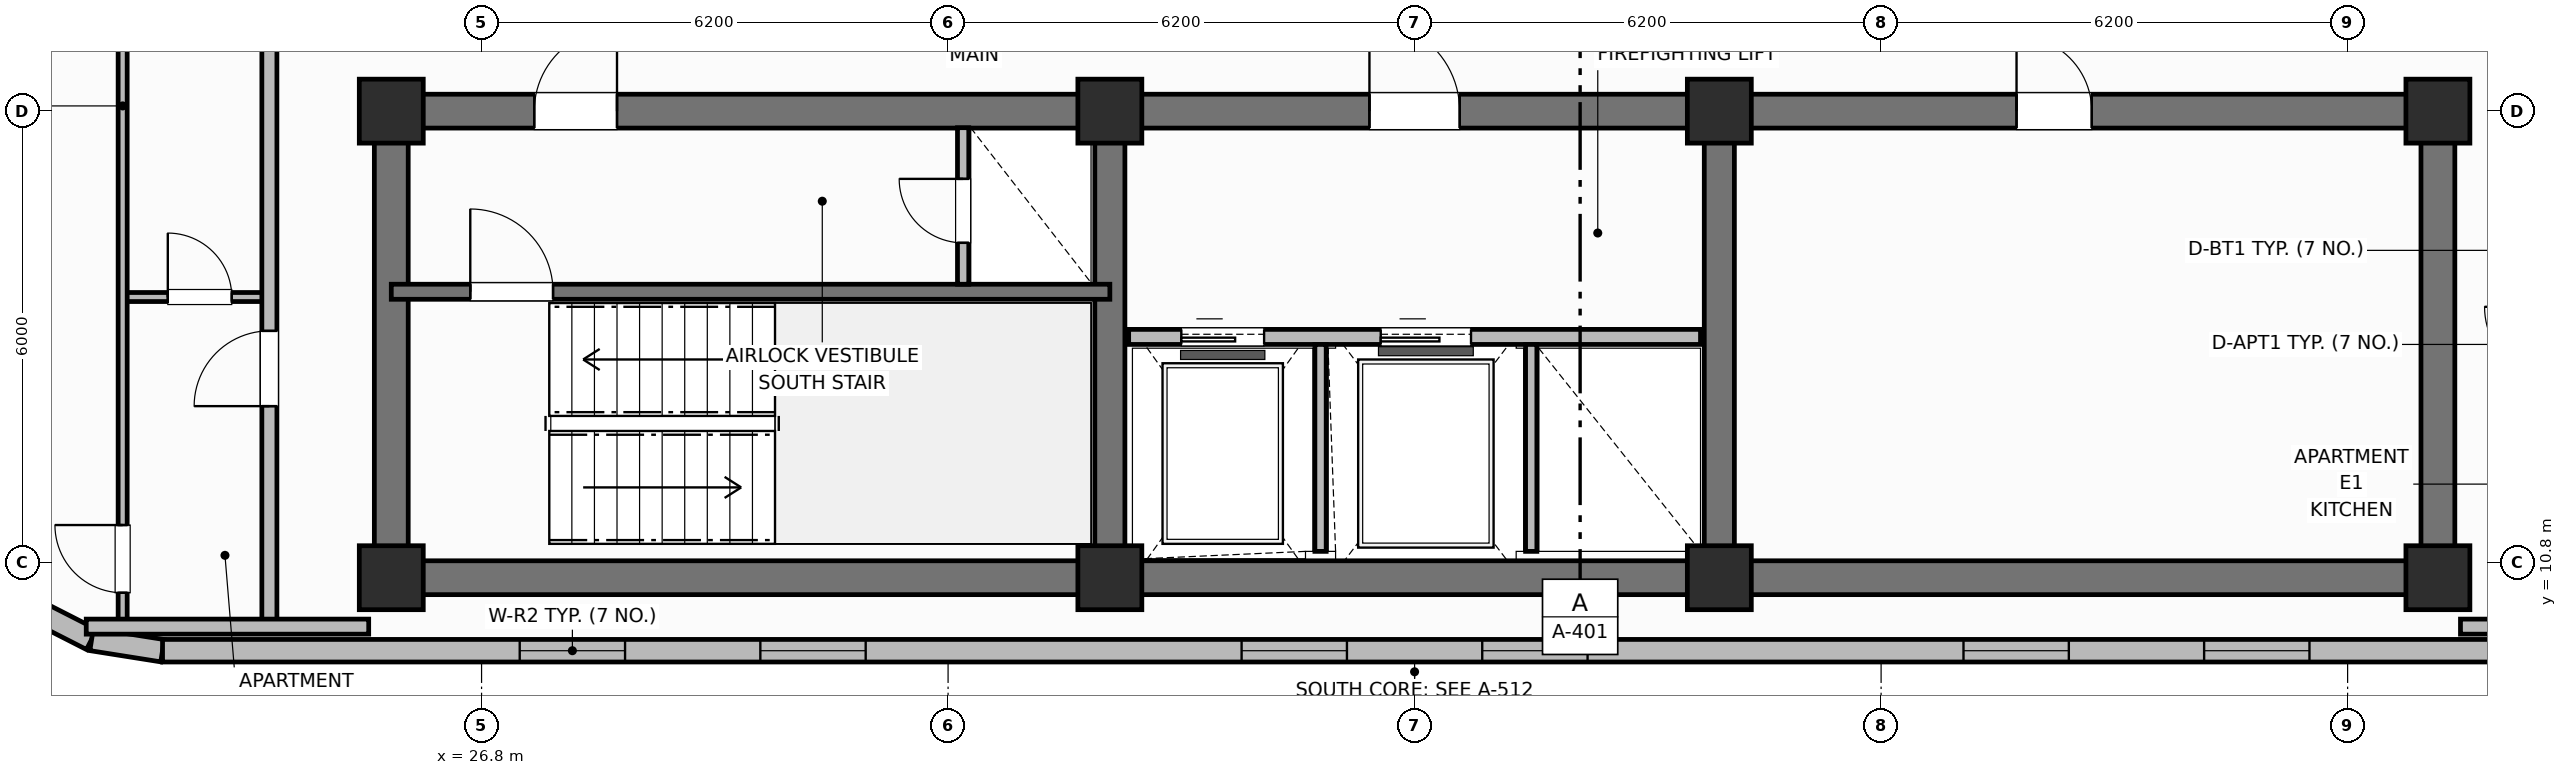
"""IFC4 building model, lengths in metres.
Left out: names, types, materials, properties, quantities, classifications, styles, units other than length and angle.
Written with IfcOpenShell. Run it as: python <this file> out.ifc"""

import sys

from ifc_helpers import new_model, si_unit, direction, frame, frame_2d, origin, origin_2d, place, context, subcontext, project, spatial, rectangle, extrude, element, fill, save


model = new_model("IFC4")
c1 = context("Model", 3, precision=1e-05, world=origin(), true_north=direction((0.0, 1.0)))
c2 = subcontext(c1, "Body", "Model", "MODEL_VIEW")
j1 = project(units=[si_unit("LENGTHUNIT", "METRE"), si_unit("PLANEANGLEUNIT", "RADIAN")], contexts=[c1])
p1 = place(None, origin())
s1 = spatial("IfcSite", under=j1, at=p1, CompositionType="ELEMENT")
p2 = place(p1, origin())
s2 = spatial("IfcBuilding", under=s1, at=p2, CompositionType="ELEMENT")
p3 = place(p2, frame((0.0, 0.0, 229.5)))
s3 = spatial("IfcBuildingStorey", under=s2, at=p3, CompositionType="ELEMENT", Elevation=229.5)
p4 = place(p3, frame((52.8, 10.6, 0.0), z_axis=(0.0, 0.0, 1.0), x_axis=(-1.0, 0.0, 0.0)))
e1 = element("IfcWall", 1, at=p4, inside=s3, PredefinedType="SHEAR", context=c2, shape_type="SweptSolid", body=[
    extrude(rectangle(XDim=27.2, YDim=0.45, at=frame_2d((13.6, 0.0))), origin(), (0.0, 0.0, 1.0), 3.7),
])
for number, where, z_axis, x_axis in (
    (2, (25.6, 10.825, 0.0), (0.0, 0.0, 1.0), (0.0, 1.0, 0.0)),
    (3, (52.8, 10.825, 0.0), (0.0, 0.0, 1.0), (0.0, 1.0, 0.0)),
):
    element("IfcWall", number, at=place(p3, frame(where, z_axis=z_axis, x_axis=x_axis)), inside=s3, PredefinedType="SHEAR", context=c2, shape_type="SweptSolid", body=[
        extrude(rectangle(XDim=5.75, YDim=0.45, at=frame_2d((2.875, 0.0))), origin(), (0.0, 0.0, 1.0), 3.7),
    ])
p5 = place(p3, frame((25.6, 16.8, 0.0), z_axis=(0.0, 0.0, 1.0), x_axis=(1.0, 0.0, 0.0)))
e4 = element("IfcWall", 4, at=p5, inside=s3, PredefinedType="SHEAR", context=c2, shape_type="SweptSolid", body=[
    extrude(rectangle(XDim=27.2, YDim=0.45, at=frame_2d((13.6, 0.0))), origin(), (0.0, 0.0, 1.0), 3.7),
])
p6 = place(p5, frame((1.9, 0.0, 0.0)))
e5 = element("IfcOpeningElement", 5, at=p6, cuts=e4, PredefinedType="OPENING", context=c2, shape_type="SweptSolid", body=[
    extrude(rectangle(XDim=1.1, YDim=2.15, at=frame_2d((0.55, 1.075))), frame((0.0, 0.235, 0.0), z_axis=(0.0, -1.0, 0.0), x_axis=(1.0, 0.0, 0.0)), (0.0, 0.0, 1.0), 0.47),
])
p7 = place(p5, frame((13.0, 0.0, 0.0)))
e6 = element("IfcOpeningElement", 6, at=p7, cuts=e4, PredefinedType="OPENING", context=c2, shape_type="SweptSolid", body=[
    extrude(rectangle(XDim=1.2, YDim=2.15, at=frame_2d((0.6, 1.075))), frame((0.0, 0.235, 0.0), z_axis=(0.0, -1.0, 0.0), x_axis=(1.0, 0.0, 0.0)), (0.0, 0.0, 1.0), 0.47),
])
p8 = place(p5, frame((21.6, 0.0, 0.0)))
e7 = element("IfcOpeningElement", 7, at=p8, cuts=e4, PredefinedType="OPENING", context=c2, shape_type="SweptSolid", body=[
    extrude(rectangle(XDim=1.0, YDim=2.15, at=frame_2d((0.5, 1.075))), frame((0.0, 0.235, 0.0), z_axis=(0.0, -1.0, 0.0), x_axis=(1.0, 0.0, 0.0)), (0.0, 0.0, 1.0), 0.47),
])
for number, where, z_axis, x_axis in (
    (8, (35.15, 10.825, 0.0), (0.0, 0.0, 1.0), (0.0, 1.0, 0.0)),
    (9, (43.25, 10.825, 0.0), (0.0, 0.0, 1.0), (0.0, 1.0, 0.0)),
):
    element("IfcWall", number, at=place(p3, frame(where, z_axis=z_axis, x_axis=x_axis)), inside=s3, PredefinedType="SHEAR", context=c2, shape_type="SweptSolid", body=[
        extrude(rectangle(XDim=5.75, YDim=0.4, at=frame_2d((2.875, 0.0))), origin(), (0.0, 0.0, 1.0), 3.7),
    ])
for number, where, z_axis, x_axis in (
    (10, (25.6, 10.6, 0.0), (0.0, 0.0, 1.0), (1.0, 0.0, 0.0)),
    (11, (25.6, 16.8, 0.0), (0.0, 0.0, 1.0), (1.0, 0.0, 0.0)),
    (12, (35.15, 10.6, 0.0), (0.0, 0.0, 1.0), (1.0, 0.0, 0.0)),
    (13, (35.15, 16.8, 0.0), (0.0, 0.0, 1.0), (1.0, 0.0, 0.0)),
    (14, (43.25, 10.6, 0.0), (0.0, 0.0, 1.0), (1.0, 0.0, 0.0)),
    (15, (43.25, 16.8, 0.0), (0.0, 0.0, 1.0), (1.0, 0.0, 0.0)),
    (16, (52.8, 10.6, 0.0), (0.0, 0.0, 1.0), (1.0, 0.0, 0.0)),
    (17, (52.8, 16.8, 0.0), (0.0, 0.0, 1.0), (1.0, 0.0, 0.0)),
):
    element("IfcColumn", number, at=place(p3, frame(where, z_axis=z_axis, x_axis=x_axis)), inside=s3, PredefinedType="COLUMN", context=c2, shape_type="SweptSolid", body=[
        extrude(rectangle(XDim=0.85, YDim=0.85, at=origin_2d()), origin(), (0.0, 0.0, 1.0), 3.7),
    ])
p9 = place(p3, frame((20.767, 10.212, 0.0), z_axis=(0.0, 0.0, 1.0), x_axis=(0.891023873617, -0.45395644796, 0.0)))
e18 = element("IfcWall", 18, at=p9, inside=s3, PredefinedType="SOLIDWALL", context=c2, shape_type="SweptSolid", body=[
    extrude(rectangle(XDim=0.954, YDim=0.3, at=frame_2d((0.477, 0.0))), origin(), (0.0, 0.0, 1.0), 2.73),
])
p10 = place(p3, frame((21.617, 9.779, 0.0), z_axis=(0.0, 0.0, 1.0), x_axis=(0.987669453596, -0.156553666304, 0.0)))
e19 = element("IfcWall", 19, at=p10, inside=s3, PredefinedType="SOLIDWALL", context=c2, shape_type="SweptSolid", body=[
    extrude(rectangle(XDim=0.954, YDim=0.3, at=frame_2d((0.477, 0.0))), origin(), (0.0, 0.0, 1.0), 2.73),
])
p11 = place(p3, frame((22.56, 9.63, 0.0), z_axis=(0.0, 0.0, 1.0), x_axis=(1.0, 0.0, 0.0)))
e20 = element("IfcWall", 20, at=p11, inside=s3, PredefinedType="SOLIDWALL", context=c2, shape_type="SweptSolid", body=[
    extrude(rectangle(XDim=33.28, YDim=0.3, at=frame_2d((16.64, 0.0))), origin(), (0.0, 0.0, 1.0), 2.73),
])
p12 = place(p11, frame((4.747, 0.0, 0.76)))
e21 = element("IfcOpeningElement", 21, at=p12, cuts=e20, PredefinedType="OPENING", context=c2, shape_type="SweptSolid", body=[
    extrude(rectangle(XDim=1.4, YDim=1.85, at=frame_2d((0.7, 0.925))), frame((0.0, 0.16, 0.0), z_axis=(0.0, -1.0, 0.0), x_axis=(1.0, 0.0, 0.0)), (0.0, 0.0, 1.0), 0.32),
])
p13 = place(p11, frame((7.945, 0.0, 0.76)))
e22 = element("IfcOpeningElement", 22, at=p13, cuts=e20, PredefinedType="OPENING", context=c2, shape_type="SweptSolid", body=[
    extrude(rectangle(XDim=1.4, YDim=1.85, at=frame_2d((0.7, 0.925))), frame((0.0, 0.16, 0.0), z_axis=(0.0, -1.0, 0.0), x_axis=(1.0, 0.0, 0.0)), (0.0, 0.0, 1.0), 0.32),
])
p14 = place(p11, frame((14.341, 0.0, 0.76)))
e23 = element("IfcOpeningElement", 23, at=p14, cuts=e20, PredefinedType="OPENING", context=c2, shape_type="SweptSolid", body=[
    extrude(rectangle(XDim=1.4, YDim=1.85, at=frame_2d((0.7, 0.925))), frame((0.0, 0.16, 0.0), z_axis=(0.0, -1.0, 0.0), x_axis=(1.0, 0.0, 0.0)), (0.0, 0.0, 1.0), 0.32),
])
p15 = place(p11, frame((17.539, 0.0, 0.76)))
e24 = element("IfcOpeningElement", 24, at=p15, cuts=e20, PredefinedType="OPENING", context=c2, shape_type="SweptSolid", body=[
    extrude(rectangle(XDim=1.4, YDim=1.85, at=frame_2d((0.7, 0.925))), frame((0.0, 0.16, 0.0), z_axis=(0.0, -1.0, 0.0), x_axis=(1.0, 0.0, 0.0)), (0.0, 0.0, 1.0), 0.32),
])
p16 = place(p11, frame((23.935, 0.0, 0.76)))
e25 = element("IfcOpeningElement", 25, at=p16, cuts=e20, PredefinedType="OPENING", context=c2, shape_type="SweptSolid", body=[
    extrude(rectangle(XDim=1.4, YDim=1.85, at=frame_2d((0.7, 0.925))), frame((0.0, 0.16, 0.0), z_axis=(0.0, -1.0, 0.0), x_axis=(1.0, 0.0, 0.0)), (0.0, 0.0, 1.0), 0.32),
])
p17 = place(p11, frame((27.133, 0.0, 0.76)))
e26 = element("IfcOpeningElement", 26, at=p17, cuts=e20, PredefinedType="OPENING", context=c2, shape_type="SweptSolid", body=[
    extrude(rectangle(XDim=1.4, YDim=1.85, at=frame_2d((0.7, 0.925))), frame((0.0, 0.16, 0.0), z_axis=(0.0, -1.0, 0.0), x_axis=(1.0, 0.0, 0.0)), (0.0, 0.0, 1.0), 0.32),
])
p18 = place(p3, frame((25.6, 14.4, 0.0), z_axis=(0.0, 0.0, 1.0), x_axis=(1.0, 0.0, 0.0)))
e27 = element("IfcWall", 27, at=p18, inside=s3, PredefinedType="SHEAR", context=c2, shape_type="SweptSolid", body=[
    extrude(rectangle(XDim=9.55, YDim=0.2, at=frame_2d((4.775, 0.0))), origin(), (0.0, 0.0, 1.0), 3.7),
])
p19 = place(p18, frame((1.05, 0.0, 0.0)))
e28 = element("IfcOpeningElement", 28, at=p19, cuts=e27, PredefinedType="OPENING", context=c2, shape_type="SweptSolid", body=[
    extrude(rectangle(XDim=1.1, YDim=2.15, at=frame_2d((0.55, 1.075))), frame((0.0, 0.11, 0.0), z_axis=(0.0, -1.0, 0.0), x_axis=(1.0, 0.0, 0.0)), (0.0, 0.0, 1.0), 0.22),
])
p20 = place(p3, frame((33.2, 14.5, 0.0), z_axis=(0.0, 0.0, 1.0), x_axis=(0.0, 1.0, 0.0)))
e29 = element("IfcWall", 29, at=p20, inside=s3, PredefinedType="PARTITIONING", context=c2, shape_type="SweptSolid", body=[
    extrude(rectangle(XDim=2.08, YDim=0.15, at=frame_2d((1.04, 0.0))), origin(), (0.0, 0.0, 1.0), 2.56),
])
p21 = place(p20, frame((0.55, 0.0, 0.0)))
e30 = element("IfcOpeningElement", 30, at=p21, cuts=e29, PredefinedType="OPENING", context=c2, shape_type="SweptSolid", body=[
    extrude(rectangle(XDim=0.85, YDim=2.05, at=frame_2d((0.425, 1.025))), frame((0.0, 0.085, 0.0), z_axis=(0.0, -1.0, 0.0), x_axis=(1.0, 0.0, 0.0)), (0.0, 0.0, 1.0), 0.17),
])
p22 = place(p3, frame((35.4, 13.8, 0.0), z_axis=(0.0, 0.0, 1.0), x_axis=(1.0, 0.0, 0.0)))
e31 = element("IfcWall", 31, at=p22, inside=s3, PredefinedType="PARTITIONING", context=c2, shape_type="SweptSolid", body=[
    extrude(rectangle(XDim=7.6, YDim=0.2, at=frame_2d((3.8, 0.0))), origin(), (0.0, 0.0, 1.0), 2.33),
])
p23 = place(p22, frame((0.7, 0.0, 0.0)))
e32 = element("IfcOpeningElement", 32, at=p23, cuts=e31, PredefinedType="OPENING", context=c2, shape_type="SweptSolid", body=[
    extrude(rectangle(XDim=1.1, YDim=2.15, at=frame_2d((0.55, 1.075))), frame((0.0, 0.11, 0.0), z_axis=(0.0, -1.0, 0.0), x_axis=(1.0, 0.0, 0.0)), (0.0, 0.0, 1.0), 0.22),
])
p24 = place(p22, frame((3.35, 0.0, 0.0)))
e33 = element("IfcOpeningElement", 33, at=p24, cuts=e31, PredefinedType="OPENING", context=c2, shape_type="SweptSolid", body=[
    extrude(rectangle(XDim=1.2, YDim=2.15, at=frame_2d((0.6, 1.075))), frame((0.0, 0.11, 0.0), z_axis=(0.0, -1.0, 0.0), x_axis=(1.0, 0.0, 0.0)), (0.0, 0.0, 1.0), 0.22),
])
for number, where, z_axis, x_axis in (
    (34, (37.95, 10.95, 0.0), (0.0, 0.0, 1.0), (0.0, 1.0, 0.0)),
    (35, (40.75, 10.95, 0.0), (0.0, 0.0, 1.0), (0.0, 1.0, 0.0)),
):
    element("IfcWall", number, at=place(p3, frame(where, z_axis=z_axis, x_axis=x_axis)), inside=s3, PredefinedType="PARTITIONING", context=c2, shape_type="SweptSolid", body=[
        extrude(rectangle(XDim=2.75, YDim=0.15, at=frame_2d((1.375, 0.0))), origin(), (0.0, 0.0, 1.0), 2.56),
    ])
p25 = place(p3, frame((22.03, 14.33, 0.0), z_axis=(0.0, 0.0, 1.0), x_axis=(1.0, 0.0, 0.0)))
e36 = element("IfcWall", 36, at=p25, inside=s3, PredefinedType="PARTITIONING", context=c2, shape_type="SweptSolid", body=[
    extrude(rectangle(XDim=1.95, YDim=0.12, at=frame_2d((0.975, 0.0))), origin(), (0.0, 0.0, 1.0), 2.56),
])
p26 = place(p25, frame((0.6, 0.0, 0.0)))
e37 = element("IfcOpeningElement", 37, at=p26, cuts=e36, PredefinedType="OPENING", context=c2, shape_type="SweptSolid", body=[
    extrude(rectangle(XDim=0.85, YDim=2.1, at=frame_2d((0.425, 1.05))), frame((0.0, 0.07, 0.0), z_axis=(0.0, -1.0, 0.0), x_axis=(1.0, 0.0, 0.0)), (0.0, 0.0, 1.0), 0.14),
])
p27 = place(p3, frame((22.03, 9.99, 0.0), z_axis=(0.0, 0.0, 1.0), x_axis=(0.0, 1.0, 0.0)))
e38 = element("IfcWall", 38, at=p27, inside=s3, PredefinedType="PARTITIONING", context=c2, shape_type="SweptSolid", body=[
    extrude(rectangle(XDim=9.045, YDim=0.12, at=frame_2d((4.522, 0.0))), origin(), (0.0, 0.0, 1.0), 2.56),
])
p28 = place(p27, frame((0.41, 0.0, 0.0)))
e39 = element("IfcOpeningElement", 39, at=p28, cuts=e38, PredefinedType="OPENING", context=c2, shape_type="SweptSolid", body=[
    extrude(rectangle(XDim=0.9, YDim=2.1, at=frame_2d((0.45, 1.05))), frame((0.0, 0.07, 0.0), z_axis=(0.0, -1.0, 0.0), x_axis=(1.0, 0.0, 0.0)), (0.0, 0.0, 1.0), 0.14),
])
p29 = place(p3, frame((23.98, 9.95, 0.0), z_axis=(0.0, 0.0, 1.0), x_axis=(0.0, 1.0, 0.0)))
e40 = element("IfcWall", 40, at=p29, inside=s3, PredefinedType="PARTITIONING", context=c2, shape_type="SweptSolid", body=[
    extrude(rectangle(XDim=36.5, YDim=0.2, at=frame_2d((18.25, 0.0))), origin(), (0.0, 0.0, 1.0), 2.56),
])
p30 = place(p29, frame((2.93, 0.0, 0.0)))
e41 = element("IfcOpeningElement", 41, at=p30, cuts=e40, PredefinedType="OPENING", context=c2, shape_type="SweptSolid", body=[
    extrude(rectangle(XDim=1.0, YDim=2.15, at=frame_2d((0.5, 1.075))), frame((0.0, 0.11, 0.0), z_axis=(0.0, -1.0, 0.0), x_axis=(1.0, 0.0, 0.0)), (0.0, 0.0, 1.0), 0.22),
])
p31 = place(p29, frame((10.525, 0.0, 0.0)))
e42 = element("IfcOpeningElement", 42, at=p31, cuts=e40, PredefinedType="OPENING", context=c2, shape_type="SweptSolid", body=[
    extrude(rectangle(XDim=1.0, YDim=2.15, at=frame_2d((0.5, 1.075))), frame((0.0, 0.11, 0.0), z_axis=(0.0, -1.0, 0.0), x_axis=(1.0, 0.0, 0.0)), (0.0, 0.0, 1.0), 0.22),
])
p32 = place(p29, frame((15.175, 0.0, 0.0)))
e43 = element("IfcOpeningElement", 43, at=p32, cuts=e40, PredefinedType="OPENING", context=c2, shape_type="SweptSolid", body=[
    extrude(rectangle(XDim=1.0, YDim=2.15, at=frame_2d((0.5, 1.075))), frame((0.0, 0.11, 0.0), z_axis=(0.0, -1.0, 0.0), x_axis=(1.0, 0.0, 0.0)), (0.0, 0.0, 1.0), 0.22),
])
p33 = place(p29, frame((27.925, 0.0, 0.0)))
e44 = element("IfcOpeningElement", 44, at=p33, cuts=e40, PredefinedType="OPENING", context=c2, shape_type="SweptSolid", body=[
    extrude(rectangle(XDim=1.0, YDim=2.15, at=frame_2d((0.5, 1.075))), frame((0.0, 0.11, 0.0), z_axis=(0.0, -1.0, 0.0), x_axis=(1.0, 0.0, 0.0)), (0.0, 0.0, 1.0), 0.22),
])
p34 = place(p3, frame((21.546, 9.95, 0.0), z_axis=(0.0, 0.0, 1.0), x_axis=(1.0, 0.0, 0.0)))
e45 = element("IfcWall", 45, at=p34, inside=s3, PredefinedType="PARTITIONING", context=c2, shape_type="SweptSolid", body=[
    extrude(rectangle(XDim=3.754, YDim=0.2, at=frame_2d((1.877, 0.0))), origin(), (0.0, 0.0, 1.0), 2.56),
])
p35 = place(p3, frame((53.1, 9.95, 0.0), z_axis=(0.0, 0.0, 1.0), x_axis=(1.0, 0.0, 0.0)))
e46 = element("IfcWall", 46, at=p35, inside=s3, PredefinedType="PARTITIONING", context=c2, shape_type="SweptSolid", body=[
    extrude(rectangle(XDim=3.754, YDim=0.2, at=frame_2d((1.877, 0.0))), origin(), (0.0, 0.0, 1.0), 2.56),
])
p36 = place(p12, origin())
e47 = element("IfcWindow", 47, at=p36, inside=s3, PartitioningType="SINGLE_PANEL", PredefinedType="WINDOW", context=c2, shape_type="SweptSolid", body=[
    extrude(rectangle(XDim=1.4, YDim=1.85, at=frame_2d((0.7, 0.925))), frame((0.0, 0.03, 0.0), z_axis=(0.0, -1.0, 0.0), x_axis=(1.0, 0.0, 0.0)), (0.0, 0.0, 1.0), 0.06),
])
fill(e21, e47)
p37 = place(p13, origin())
e48 = element("IfcWindow", 48, at=p37, inside=s3, PartitioningType="SINGLE_PANEL", PredefinedType="WINDOW", context=c2, shape_type="SweptSolid", body=[
    extrude(rectangle(XDim=1.4, YDim=1.85, at=frame_2d((0.7, 0.925))), frame((0.0, 0.03, 0.0), z_axis=(0.0, -1.0, 0.0), x_axis=(1.0, 0.0, 0.0)), (0.0, 0.0, 1.0), 0.06),
])
fill(e22, e48)
p38 = place(p14, origin())
e49 = element("IfcWindow", 49, at=p38, inside=s3, PartitioningType="SINGLE_PANEL", PredefinedType="WINDOW", context=c2, shape_type="SweptSolid", body=[
    extrude(rectangle(XDim=1.4, YDim=1.85, at=frame_2d((0.7, 0.925))), frame((0.0, 0.03, 0.0), z_axis=(0.0, -1.0, 0.0), x_axis=(1.0, 0.0, 0.0)), (0.0, 0.0, 1.0), 0.06),
])
fill(e23, e49)
p39 = place(p15, origin())
e50 = element("IfcWindow", 50, at=p39, inside=s3, PartitioningType="SINGLE_PANEL", PredefinedType="WINDOW", context=c2, shape_type="SweptSolid", body=[
    extrude(rectangle(XDim=1.4, YDim=1.85, at=frame_2d((0.7, 0.925))), frame((0.0, 0.03, 0.0), z_axis=(0.0, -1.0, 0.0), x_axis=(1.0, 0.0, 0.0)), (0.0, 0.0, 1.0), 0.06),
])
fill(e24, e50)
p40 = place(p16, origin())
e51 = element("IfcWindow", 51, at=p40, inside=s3, PartitioningType="SINGLE_PANEL", PredefinedType="WINDOW", context=c2, shape_type="SweptSolid", body=[
    extrude(rectangle(XDim=1.4, YDim=1.85, at=frame_2d((0.7, 0.925))), frame((0.0, 0.03, 0.0), z_axis=(0.0, -1.0, 0.0), x_axis=(1.0, 0.0, 0.0)), (0.0, 0.0, 1.0), 0.06),
])
fill(e25, e51)
p41 = place(p17, origin())
e52 = element("IfcWindow", 52, at=p41, inside=s3, PartitioningType="SINGLE_PANEL", PredefinedType="WINDOW", context=c2, shape_type="SweptSolid", body=[
    extrude(rectangle(XDim=1.4, YDim=1.85, at=frame_2d((0.7, 0.925))), frame((0.0, 0.03, 0.0), z_axis=(0.0, -1.0, 0.0), x_axis=(1.0, 0.0, 0.0)), (0.0, 0.0, 1.0), 0.06),
])
fill(e26, e52)
p42 = place(p19, origin())
e53 = element("IfcDoor", 53, at=p42, inside=s3, OperationType="SINGLE_SWING_LEFT", PredefinedType="DOOR", context=c2, shape_type="SweptSolid", body=[
    extrude(rectangle(XDim=1.1, YDim=2.15, at=frame_2d((0.55, 1.075))), frame((0.0, 0.025, 0.0), z_axis=(0.0, -1.0, 0.0), x_axis=(1.0, 0.0, 0.0)), (0.0, 0.0, 1.0), 0.05),
])
fill(e28, e53)
p43 = place(p21, origin())
e54 = element("IfcDoor", 54, at=p43, inside=s3, OperationType="SINGLE_SWING_RIGHT", PredefinedType="TRAPDOOR", context=c2, shape_type="SweptSolid", body=[
    extrude(rectangle(XDim=0.85, YDim=2.05, at=frame_2d((0.425, 1.025))), frame((0.0, 0.025, 0.0), z_axis=(0.0, -1.0, 0.0), x_axis=(1.0, 0.0, 0.0)), (0.0, 0.0, 1.0), 0.05),
])
fill(e30, e54)
p44 = place(p23, origin())
e55 = element("IfcDoor", 55, at=p44, inside=s3, OperationType="SLIDING_TO_LEFT", PredefinedType="DOOR", context=c2, shape_type="SweptSolid", body=[
    extrude(rectangle(XDim=1.1, YDim=2.15, at=frame_2d((0.55, 1.075))), frame((0.0, 0.025, 0.0), z_axis=(0.0, -1.0, 0.0), x_axis=(1.0, 0.0, 0.0)), (0.0, 0.0, 1.0), 0.05),
])
fill(e32, e55)
p45 = place(p24, origin())
e56 = element("IfcDoor", 56, at=p45, inside=s3, OperationType="SLIDING_TO_LEFT", PredefinedType="DOOR", context=c2, shape_type="SweptSolid", body=[
    extrude(rectangle(XDim=1.2, YDim=2.15, at=frame_2d((0.6, 1.075))), frame((0.0, 0.025, 0.0), z_axis=(0.0, -1.0, 0.0), x_axis=(1.0, 0.0, 0.0)), (0.0, 0.0, 1.0), 0.05),
])
fill(e33, e56)
p46 = place(p26, origin())
e57 = element("IfcDoor", 57, at=p46, inside=s3, OperationType="SINGLE_SWING_LEFT", PredefinedType="DOOR", context=c2, shape_type="SweptSolid", body=[
    extrude(rectangle(XDim=0.85, YDim=2.1, at=frame_2d((0.425, 1.05))), frame((0.0, 0.025, 0.0), z_axis=(0.0, -1.0, 0.0), x_axis=(1.0, 0.0, 0.0)), (0.0, 0.0, 1.0), 0.05),
])
fill(e37, e57)
p47 = place(p28, origin())
e58 = element("IfcDoor", 58, at=p47, inside=s3, OperationType="SINGLE_SWING_RIGHT", PredefinedType="DOOR", context=c2, shape_type="SweptSolid", body=[
    extrude(rectangle(XDim=0.9, YDim=2.1, at=frame_2d((0.45, 1.05))), frame((0.0, 0.025, 0.0), z_axis=(0.0, -1.0, 0.0), x_axis=(1.0, 0.0, 0.0)), (0.0, 0.0, 1.0), 0.05),
])
fill(e39, e58)
p48 = place(p30, origin())
e59 = element("IfcDoor", 59, at=p48, inside=s3, OperationType="SINGLE_SWING_LEFT", PredefinedType="DOOR", context=c2, shape_type="SweptSolid", body=[
    extrude(rectangle(XDim=1.0, YDim=2.15, at=frame_2d((0.5, 1.075))), frame((0.0, 0.025, 0.0), z_axis=(0.0, -1.0, 0.0), x_axis=(1.0, 0.0, 0.0)), (0.0, 0.0, 1.0), 0.05),
])
fill(e41, e59)
p49 = place(p6, origin())
e60 = element("IfcDoor", 60, at=p49, inside=s3, OperationType="SINGLE_SWING_RIGHT", PredefinedType="DOOR", context=c2, shape_type="SweptSolid", body=[
    extrude(rectangle(XDim=1.1, YDim=2.15, at=frame_2d((0.55, 1.075))), frame((0.0, 0.025, 0.0), z_axis=(0.0, -1.0, 0.0), x_axis=(1.0, 0.0, 0.0)), (0.0, 0.0, 1.0), 0.05),
])
fill(e5, e60)
p50 = place(p7, origin())
e61 = element("IfcDoor", 61, at=p50, inside=s3, OperationType="SINGLE_SWING_LEFT", PredefinedType="DOOR", context=c2, shape_type="SweptSolid", body=[
    extrude(rectangle(XDim=1.2, YDim=2.15, at=frame_2d((0.6, 1.075))), frame((0.0, 0.025, 0.0), z_axis=(0.0, -1.0, 0.0), x_axis=(1.0, 0.0, 0.0)), (0.0, 0.0, 1.0), 0.05),
])
fill(e6, e61)
p51 = place(p8, origin())
e62 = element("IfcDoor", 62, at=p51, inside=s3, OperationType="SINGLE_SWING_LEFT", PredefinedType="DOOR", context=c2, shape_type="SweptSolid", body=[
    extrude(rectangle(XDim=1.0, YDim=2.15, at=frame_2d((0.5, 1.075))), frame((0.0, 0.025, 0.0), z_axis=(0.0, -1.0, 0.0), x_axis=(1.0, 0.0, 0.0)), (0.0, 0.0, 1.0), 0.05),
])
fill(e7, e62)
save(model, sys.argv[1])
